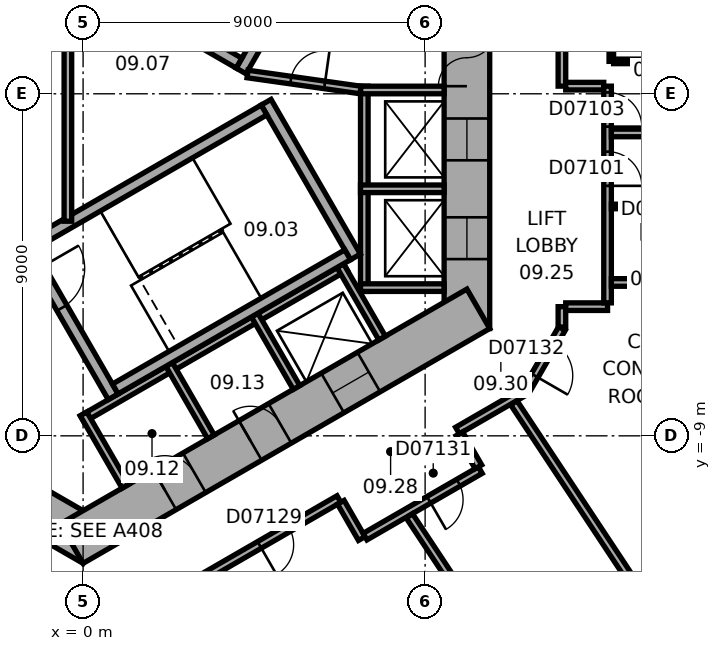
"""IFC4 building model, lengths in metres.
Left out: names, types, materials, properties, quantities, classifications, styles, units other than length and angle.
Written with IfcOpenShell. Run it as: python <this file> out.ifc"""

import sys

from ifc_helpers import new_model, si_unit, direction, frame, frame_2d, origin, place, context, subcontext, project, spatial, rectangle, extrude, element, fill, save


model = new_model("IFC4")
c1 = context("Model", 3, precision=1e-05, world=origin(), true_north=direction((0.0, 1.0)))
c2 = subcontext(c1, "Body", "Model", "MODEL_VIEW")
j1 = project(units=[si_unit("LENGTHUNIT", "METRE"), si_unit("PLANEANGLEUNIT", "RADIAN")], contexts=[c1])
p1 = place(None, origin())
s1 = spatial("IfcSite", under=j1, at=p1, CompositionType="ELEMENT")
p2 = place(p1, origin())
s2 = spatial("IfcBuilding", under=s1, at=p2, CompositionType="ELEMENT")
p3 = place(p2, frame((0.0, 0.0, 50.6)))
s3 = spatial("IfcBuildingStorey", under=s2, at=p3, CompositionType="ELEMENT", Elevation=50.6)
p4 = place(p3, frame((10.1, -6.177, 0.0), z_axis=(0.0, 0.0, 1.0), x_axis=(0.0, 1.0, 0.0)))
e1 = element("IfcWall", 1, at=p4, inside=s3, PredefinedType="SHEAR", context=c2, shape_type="SweptSolid", body=[
    extrude(rectangle(XDim=12.355, YDim=1.2, at=frame_2d((6.177, 0.0))), origin(), (0.0, 0.0, 1.0), 3.3),
])
p5 = place(p4, frame((6.378, 0.0, 0.0)))
e2 = element("IfcOpeningElement", 2, at=p5, cuts=e1, PredefinedType="OPENING", context=c2, shape_type="SweptSolid", body=[
    extrude(rectangle(XDim=1.5, YDim=2.1, at=frame_2d((0.75, 1.05))), frame((0.0, 0.61, 0.0), z_axis=(0.0, -1.0, 0.0), x_axis=(1.0, 0.0, 0.0)), (0.0, 0.0, 1.0), 1.22),
])
p6 = place(p4, frame((1.828, 0.0, 0.0)))
e3 = element("IfcOpeningElement", 3, at=p6, cuts=e1, PredefinedType="OPENING", context=c2, shape_type="SweptSolid", body=[
    extrude(rectangle(XDim=1.1, YDim=2.1, at=frame_2d((0.55, 1.05))), frame((0.0, 0.61, 0.0), z_axis=(0.0, -1.0, 0.0), x_axis=(1.0, 0.0, 0.0)), (0.0, 0.0, 1.0), 1.22),
])
p7 = place(p4, frame((4.427, 0.0, 0.0)))
e4 = element("IfcOpeningElement", 4, at=p7, cuts=e1, PredefinedType="OPENING", context=c2, shape_type="SweptSolid", body=[
    extrude(rectangle(XDim=1.1, YDim=2.1, at=frame_2d((0.55, 1.05))), frame((0.0, 0.61, 0.0), z_axis=(0.0, -1.0, 0.0), x_axis=(1.0, 0.0, 0.0)), (0.0, 0.0, 1.0), 1.22),
])
p8 = place(p3, frame((-10.4, -5.658, 0.0), z_axis=(0.0, 0.0, 1.0), x_axis=(0.866021384402, -0.500006961711, 0.0)))
e5 = element("IfcWall", 5, at=p8, inside=s3, PredefinedType="SHEAR", context=c2, shape_type="SweptSolid", body=[
    extrude(rectangle(XDim=12.355, YDim=1.2, at=frame_2d((6.178, 0.0))), origin(), (0.0, 0.0, 1.0), 3.3),
])
p9 = place(p8, frame((6.378, 0.0, 0.0)))
e6 = element("IfcOpeningElement", 6, at=p9, cuts=e5, PredefinedType="OPENING", context=c2, shape_type="SweptSolid", body=[
    extrude(rectangle(XDim=1.5, YDim=2.1, at=frame_2d((0.75, 1.05))), frame((0.0, 0.61, 0.0), z_axis=(0.0, -1.0, 0.0), x_axis=(1.0, 0.0, 0.0)), (0.0, 0.0, 1.0), 1.22),
])
p10 = place(p8, frame((3.228, 0.0, 0.0)))
e7 = element("IfcOpeningElement", 7, at=p10, cuts=e5, PredefinedType="OPENING", context=c2, shape_type="SweptSolid", body=[
    extrude(rectangle(XDim=0.9, YDim=2.1, at=frame_2d((0.45, 1.05))), frame((0.0, 0.61, 0.0), z_axis=(0.0, -1.0, 0.0), x_axis=(1.0, 0.0, 0.0)), (0.0, 0.0, 1.0), 1.22),
])
p11 = place(p3, frame((-0.3, -11.836, 0.0), z_axis=(0.0, 0.0, 1.0), x_axis=(0.866021384402, 0.500006961711, 0.0)))
e8 = element("IfcWall", 8, at=p11, inside=s3, PredefinedType="SHEAR", context=c2, shape_type="SweptSolid", body=[
    extrude(rectangle(XDim=12.355, YDim=1.2, at=frame_2d((6.178, 0.0))), origin(), (0.0, 0.0, 1.0), 3.3),
])
p12 = place(p11, frame((2.828, 0.0, 0.0)))
e9 = element("IfcOpeningElement", 9, at=p12, cuts=e8, PredefinedType="OPENING", context=c2, shape_type="SweptSolid", body=[
    extrude(rectangle(XDim=0.9, YDim=2.1, at=frame_2d((0.45, 1.05))), frame((0.0, 0.61, 0.0), z_axis=(0.0, -1.0, 0.0), x_axis=(1.0, 0.0, 0.0)), (0.0, 0.0, 1.0), 1.22),
])
p13 = place(p11, frame((5.428, 0.0, 0.0)))
e10 = element("IfcOpeningElement", 10, at=p13, cuts=e8, PredefinedType="OPENING", context=c2, shape_type="SweptSolid", body=[
    extrude(rectangle(XDim=0.9, YDim=2.1, at=frame_2d((0.45, 1.05))), frame((0.0, 0.61, 0.0), z_axis=(0.0, -1.0, 0.0), x_axis=(1.0, 0.0, 0.0)), (0.0, 0.0, 1.0), 1.22),
])
p14 = place(p11, frame((7.928, 0.0, 0.0)))
e11 = element("IfcOpeningElement", 11, at=p14, cuts=e8, PredefinedType="OPENING", context=c2, shape_type="SweptSolid", body=[
    extrude(rectangle(XDim=1.1, YDim=2.1, at=frame_2d((0.55, 1.05))), frame((0.0, 0.61, 0.0), z_axis=(0.0, -1.0, 0.0), x_axis=(1.0, 0.0, 0.0)), (0.0, 0.0, 1.0), 1.22),
])
p15 = place(p3, frame((7.4, -5.2, 0.0), z_axis=(0.0, 0.0, 1.0), x_axis=(0.0, 1.0, 0.0)))
e12 = element("IfcWall", 12, at=p15, inside=s3, PredefinedType="PARTITIONING", context=c2, shape_type="SweptSolid", body=[
    extrude(rectangle(XDim=5.4, YDim=0.2, at=frame_2d((2.7, 0.0))), origin(), (0.0, 0.0, 1.0), 3.05),
])
for number, where, z_axis, x_axis in (
    (13, (7.3, -5.1, 0.0), (0.0, 0.0, 1.0), (1.0, 0.0, 0.0)),
    (14, (7.3, -2.5, 0.0), (0.0, 0.0, 1.0), (1.0, 0.0, 0.0)),
    (15, (7.3, 0.1, 0.0), (0.0, 0.0, 1.0), (1.0, 0.0, 0.0)),
):
    element("IfcWall", number, at=place(p3, frame(where, z_axis=z_axis, x_axis=x_axis)), inside=s3, PredefinedType="PARTITIONING", context=c2, shape_type="SweptSolid", body=[
        extrude(rectangle(XDim=2.2, YDim=0.2, at=frame_2d((1.1, 0.0))), origin(), (0.0, 0.0, 1.0), 3.05),
    ])
p16 = place(p3, frame((-0.024, -8.559, 0.0), z_axis=(0.0, 0.0, 1.0), x_axis=(0.866026010844, 0.49999894854, 0.0)))
e16 = element("IfcWall", 16, at=p16, inside=s3, PredefinedType="PARTITIONING", context=c2, shape_type="SweptSolid", body=[
    extrude(rectangle(XDim=8.0, YDim=0.2, at=frame_2d((4.0, 0.0))), origin(), (0.0, 0.0, 1.0), 3.05),
])
for number, where, z_axis, x_axis in (
    (17, (0.013, -8.422, 0.0), (0.0, 0.0, 1.0), (0.5, -0.866, 0.0)),
    (18, (2.264, -7.122, 0.0), (0.0, 0.0, 1.0), (0.5, -0.866, 0.0)),
    (19, (4.516, -5.822, 0.0), (0.0, 0.0, 1.0), (0.5, -0.866, 0.0)),
    (20, (6.768, -4.522, 0.0), (0.0, 0.0, 1.0), (0.5, -0.866, 0.0)),
):
    element("IfcWall", number, at=place(p3, frame(where, z_axis=z_axis, x_axis=x_axis)), inside=s3, PredefinedType="PARTITIONING", context=c2, shape_type="SweptSolid", body=[
        extrude(rectangle(XDim=2.2, YDim=0.2, at=frame_2d((1.1, 0.0))), origin(), (0.0, 0.0, 1.0), 3.05),
    ])
p17 = place(p3, frame((4.158, 0.602, 0.0), z_axis=(0.0, 0.0, 1.0), x_axis=(0.499977259774, 0.866038532462, 0.0)))
e21 = element("IfcWall", 21, at=p17, inside=s3, PredefinedType="SHEAR", context=c2, shape_type="SweptSolid", body=[
    extrude(rectangle(XDim=4.7, YDim=0.3, at=frame_2d((2.35, 0.0))), origin(), (0.0, 0.0, 1.0), 3.05),
])
p18 = place(p17, frame((0.8, 0.0, 0.0)))
e22 = element("IfcOpeningElement", 22, at=p18, cuts=e21, PredefinedType="OPENING", context=c2, shape_type="SweptSolid", body=[
    extrude(rectangle(XDim=1.2, YDim=2.1, at=frame_2d((0.6, 1.05))), frame((0.0, 0.16, 0.0), z_axis=(0.0, -1.0, 0.0), x_axis=(1.0, 0.0, 0.0)), (0.0, 0.0, 1.0), 0.32),
])
p19 = place(p3, frame((4.103, 0.807, 0.0), z_axis=(0.0, 0.0, 1.0), x_axis=(-0.866027801685, 0.499995846692, 0.0)))
e23 = element("IfcWall", 23, at=p19, inside=s3, PredefinedType="SHEAR", context=c2, shape_type="SweptSolid", body=[
    extrude(rectangle(XDim=7.06, YDim=0.3, at=frame_2d((3.53, 0.0))), origin(), (0.0, 0.0, 1.0), 3.05),
])
p20 = place(p3, frame((-1.558, -3.902, 0.0), z_axis=(0.0, 0.0, 1.0), x_axis=(0.499977259774, -0.866038532462, 0.0)))
e24 = element("IfcWall", 24, at=p20, inside=s3, PredefinedType="SHEAR", context=c2, shape_type="SweptSolid", body=[
    extrude(rectangle(XDim=4.7, YDim=0.3, at=frame_2d((2.35, 0.0))), origin(), (0.0, 0.0, 1.0), 3.05),
])
p21 = place(p20, frame((0.8, 0.0, 0.0)))
e25 = element("IfcOpeningElement", 25, at=p21, cuts=e24, PredefinedType="OPENING", context=c2, shape_type="SweptSolid", body=[
    extrude(rectangle(XDim=1.2, YDim=2.1, at=frame_2d((0.6, 1.05))), frame((0.0, 0.16, 0.0), z_axis=(0.0, -1.0, 0.0), x_axis=(1.0, 0.0, 0.0)), (0.0, 0.0, 1.0), 0.32),
])
p22 = place(p3, frame((4.816, -0.222, 0.0), z_axis=(0.0, 0.0, 1.0), x_axis=(0.499977259774, -0.866038532462, 0.0)))
e26 = element("IfcWall", 26, at=p22, inside=s3, PredefinedType="SHEAR", context=c2, shape_type="SweptSolid", body=[
    extrude(rectangle(XDim=4.7, YDim=0.3, at=frame_2d((2.35, 0.0))), origin(), (0.0, 0.0, 1.0), 3.05),
])
for number, where, z_axis, x_axis in (
    (27, (-1.353, -3.957, 0.0), (0.0, 0.0, 1.0), (0.866, 0.5, 0.0)),
    (28, (0.847, -7.767, 0.0), (0.0, 0.0, 1.0), (0.866, 0.5, 0.0)),
):
    element("IfcWall", number, at=place(p3, frame(where, z_axis=z_axis, x_axis=x_axis)), inside=s3, PredefinedType="SHEAR", context=c2, shape_type="SweptSolid", body=[
        extrude(rectangle(XDim=7.06, YDim=0.3, at=frame_2d((3.53, 0.0))), origin(), (0.0, 0.0, 1.0), 3.05),
    ])
p23 = place(p3, frame((4.327, 0.521, 0.0), z_axis=(0.0, 0.0, 1.0), x_axis=(0.990124376366, -0.14019172346, 0.0)))
e29 = element("IfcWall", 29, at=p23, inside=s3, PredefinedType="PARTITIONING", context=c2, shape_type="SweptSolid", body=[
    extrude(rectangle(XDim=3.002, YDim=0.2, at=frame_2d((1.501, 0.0))), origin(), (0.0, 0.0, 1.0), 3.05),
])
p24 = place(p23, frame((1.15, 0.0, 0.0)))
e30 = element("IfcOpeningElement", 30, at=p24, cuts=e29, PredefinedType="OPENING", context=c2, shape_type="SweptSolid", body=[
    extrude(rectangle(XDim=0.9, YDim=2.1, at=frame_2d((0.45, 1.05))), frame((0.0, 0.11, 0.0), z_axis=(0.0, -1.0, 0.0), x_axis=(1.0, 0.0, 0.0)), (0.0, 0.0, 1.0), 0.22),
])
p25 = place(p3, frame((-0.4, -3.353, 0.0), z_axis=(0.0, 0.0, 1.0), x_axis=(0.0, 1.0, 0.0)))
e31 = element("IfcWall", 31, at=p25, inside=s3, PredefinedType="PARTITIONING", context=c2, shape_type="SweptSolid", body=[
    extrude(rectangle(XDim=6.707, YDim=0.2, at=frame_2d((3.353, 0.0))), origin(), (0.0, 0.0, 1.0), 3.05),
])
p26 = place(p3, frame((1.033, -13.953, 0.0), z_axis=(0.0, 0.0, 1.0), x_axis=(0.866017531406, 0.500013635111, 0.0)))
e32 = element("IfcWall", 32, at=p26, inside=s3, PredefinedType="PARTITIONING", context=c2, shape_type="SweptSolid", body=[
    extrude(rectangle(XDim=6.58, YDim=0.2, at=frame_2d((3.29, 0.0))), origin(), (0.0, 0.0, 1.0), 3.05),
])
p27 = place(p26, frame((4.165, 0.0, 0.0)))
e33 = element("IfcOpeningElement", 33, at=p27, cuts=e32, PredefinedType="OPENING", context=c2, shape_type="SweptSolid", body=[
    extrude(rectangle(XDim=0.9, YDim=2.1, at=frame_2d((0.45, 1.05))), frame((0.0, 0.11, 0.0), z_axis=(0.0, -1.0, 0.0), x_axis=(1.0, 0.0, 0.0)), (0.0, 0.0, 1.0), 0.22),
])
p28 = place(p3, frame((6.782, -10.749, 0.0), z_axis=(0.0, 0.0, 1.0), x_axis=(0.500074377092, -0.865982457891, 0.0)))
e34 = element("IfcWall", 34, at=p28, inside=s3, PredefinedType="PARTITIONING", context=c2, shape_type="SweptSolid", body=[
    extrude(rectangle(XDim=1.101, YDim=0.2, at=frame_2d((0.55, 0.0))), origin(), (0.0, 0.0, 1.0), 3.05),
])
p29 = place(p3, frame((7.419, -11.653, 0.0), z_axis=(0.0, 0.0, 1.0), x_axis=(0.866038154057, 0.49997791523, 0.0)))
e35 = element("IfcWall", 35, at=p29, inside=s3, PredefinedType="PARTITIONING", context=c2, shape_type="SweptSolid", body=[
    extrude(rectangle(XDim=3.502, YDim=0.2, at=frame_2d((1.751, 0.0))), origin(), (0.0, 0.0, 1.0), 3.05),
])
p30 = place(p29, frame((1.94, 0.0, 0.0)))
e36 = element("IfcOpeningElement", 36, at=p30, cuts=e35, PredefinedType="OPENING", context=c2, shape_type="SweptSolid", body=[
    extrude(rectangle(XDim=0.9, YDim=2.1, at=frame_2d((0.45, 1.05))), frame((0.0, 0.11, 0.0), z_axis=(0.0, -1.0, 0.0), x_axis=(1.0, 0.0, 0.0)), (0.0, 0.0, 1.0), 0.22),
])
p31 = place(p3, frame((9.852, -8.861, 0.0), z_axis=(0.0, 0.0, 1.0), x_axis=(0.866013291437, 0.500020978615, 0.0)))
e37 = element("IfcWall", 37, at=p31, inside=s3, PredefinedType="PARTITIONING", context=c2, shape_type="SweptSolid", body=[
    extrude(rectangle(XDim=2.077, YDim=0.2, at=frame_2d((1.038, 0.0))), origin(), (0.0, 0.0, 1.0), 3.05),
])
p32 = place(p3, frame((10.402, -9.815, 0.0), z_axis=(0.0, 0.0, 1.0), x_axis=(-0.499968756647, 0.866043441391, 0.0)))
e38 = element("IfcWall", 38, at=p32, inside=s3, PredefinedType="PARTITIONING", context=c2, shape_type="SweptSolid", body=[
    extrude(rectangle(XDim=1.001, YDim=0.2, at=frame_2d((0.5, 0.0))), origin(), (0.0, 0.0, 1.0), 3.05),
])
p33 = place(p3, frame((11.67, -7.788, 0.0), z_axis=(0.0, 0.0, 1.0), x_axis=(0.500063286585, 0.865988862174, 0.0)))
e39 = element("IfcWall", 39, at=p33, inside=s3, PredefinedType="PARTITIONING", context=c2, shape_type="SweptSolid", body=[
    extrude(rectangle(XDim=1.86, YDim=0.2, at=frame_2d((0.93, 0.0))), origin(), (0.0, 0.0, 1.0), 3.05),
])
p34 = place(p33, frame((0.43, 0.0, 0.0)))
e40 = element("IfcOpeningElement", 40, at=p34, cuts=e39, PredefinedType="OPENING", context=c2, shape_type="SweptSolid", body=[
    extrude(rectangle(XDim=1.0, YDim=2.1, at=frame_2d((0.5, 1.05))), frame((0.0, 0.11, 0.0), z_axis=(0.0, -1.0, 0.0), x_axis=(1.0, 0.0, 0.0)), (0.0, 0.0, 1.0), 0.22),
])
p35 = place(p3, frame((12.6, -6.138, 0.0), z_axis=(0.0, 0.0, 1.0), x_axis=(0.0, 1.0, 0.0)))
e41 = element("IfcWall", 41, at=p35, inside=s3, PredefinedType="PARTITIONING", context=c2, shape_type="SweptSolid", body=[
    extrude(rectangle(XDim=0.537, YDim=0.2, at=frame_2d((0.268, 0.0))), origin(), (0.0, 0.0, 1.0), 3.05),
])
p36 = place(p3, frame((12.6, 0.201, 0.0), z_axis=(0.0, 0.0, 1.0), x_axis=(0.0, 1.0, 0.0)))
e42 = element("IfcWall", 42, at=p36, inside=s3, PredefinedType="PARTITIONING", context=c2, shape_type="SweptSolid", body=[
    extrude(rectangle(XDim=2.604, YDim=0.2, at=frame_2d((1.302, 0.0))), origin(), (0.0, 0.0, 1.0), 3.05),
])
p37 = place(p3, frame((12.7, -5.601, 0.0), z_axis=(0.0, 0.0, 1.0), x_axis=(1.0, 0.0, 0.0)))
e43 = element("IfcWall", 43, at=p37, inside=s3, PredefinedType="PARTITIONING", context=c2, shape_type="SweptSolid", body=[
    extrude(rectangle(XDim=1.101, YDim=0.2, at=frame_2d((0.551, 0.0))), origin(), (0.0, 0.0, 1.0), 3.05),
])
p38 = place(p3, frame((12.974, -17.735, 0.0), z_axis=(0.0, 0.0, 1.0), x_axis=(-0.55192625685, 0.833892922982, 0.0)))
e44 = element("IfcWall", 44, at=p38, inside=s3, PredefinedType="PARTITIONING", context=c2, shape_type="SweptSolid", body=[
    extrude(rectangle(XDim=7.95, YDim=0.2, at=frame_2d((3.975, 0.0))), origin(), (0.0, 0.0, 1.0), 3.05),
])
p39 = place(p3, frame((13.701, 0.201, 0.0), z_axis=(0.0, 0.0, 1.0), x_axis=(-1.0, 0.0, 0.0)))
e45 = element("IfcWall", 45, at=p39, inside=s3, PredefinedType="PARTITIONING", context=c2, shape_type="SweptSolid", body=[
    extrude(rectangle(XDim=1.001, YDim=0.2, at=frame_2d((0.5, 0.0))), origin(), (0.0, 0.0, 1.0), 3.05),
])
p40 = place(p3, frame((13.801, -5.501, 0.0), z_axis=(0.0, 0.0, 1.0), x_axis=(0.0, 1.0, 0.0)))
e46 = element("IfcWall", 46, at=p40, inside=s3, PredefinedType="PARTITIONING", context=c2, shape_type="SweptSolid", body=[
    extrude(rectangle(XDim=5.702, YDim=0.2, at=frame_2d((2.851, 0.0))), origin(), (0.0, 0.0, 1.0), 3.05),
])
p41 = place(p40, frame((3.079, 0.0, 0.0)))
e47 = element("IfcOpeningElement", 47, at=p41, cuts=e46, PredefinedType="OPENING", context=c2, shape_type="SweptSolid", body=[
    extrude(rectangle(XDim=0.9, YDim=2.1, at=frame_2d((0.45, 1.05))), frame((0.0, 0.11, 0.0), z_axis=(0.0, -1.0, 0.0), x_axis=(1.0, 0.0, 0.0)), (0.0, 0.0, 1.0), 0.22),
])
p42 = place(p40, frame((4.636, 0.0, 0.0)))
e48 = element("IfcOpeningElement", 48, at=p42, cuts=e46, PredefinedType="OPENING", context=c2, shape_type="SweptSolid", body=[
    extrude(rectangle(XDim=0.9, YDim=2.1, at=frame_2d((0.45, 1.05))), frame((0.0, 0.11, 0.0), z_axis=(0.0, -1.0, 0.0), x_axis=(1.0, 0.0, 0.0)), (0.0, 0.0, 1.0), 0.22),
])
p43 = place(p3, frame((13.901, -4.965, 0.0), z_axis=(0.0, 0.0, 1.0), x_axis=(1.0, 0.0, 0.0)))
e49 = element("IfcWall", 49, at=p43, inside=s3, PredefinedType="PARTITIONING", context=c2, shape_type="SweptSolid", body=[
    extrude(rectangle(XDim=8.049, YDim=0.2, at=frame_2d((4.024, 0.0))), origin(), (0.0, 0.0, 1.0), 3.05),
])
p44 = place(p3, frame((13.901, -2.965, 0.0), z_axis=(0.0, 0.0, 1.0), x_axis=(1.0, 0.0, 0.0)))
e50 = element("IfcWall", 50, at=p44, inside=s3, PredefinedType="PARTITIONING", context=c2, shape_type="SweptSolid", body=[
    extrude(rectangle(XDim=2.5, YDim=0.12, at=frame_2d((1.25, 0.0))), origin(), (0.0, 0.0, 1.0), 3.05),
])
p45 = place(p44, frame((0.8, 0.0, 0.0)))
e51 = element("IfcOpeningElement", 51, at=p45, cuts=e50, PredefinedType="OPENING", context=c2, shape_type="SweptSolid", body=[
    extrude(rectangle(XDim=0.9, YDim=2.1, at=frame_2d((0.45, 1.05))), frame((0.0, 0.07, 0.0), z_axis=(0.0, -1.0, 0.0), x_axis=(1.0, 0.0, 0.0)), (0.0, 0.0, 1.0), 0.14),
])
p46 = place(p3, frame((13.9, 0.853, 0.0), z_axis=(0.0, 0.0, 1.0), x_axis=(0.0, 1.0, 0.0)))
e52 = element("IfcWall", 52, at=p46, inside=s3, PredefinedType="PARTITIONING", context=c2, shape_type="SweptSolid", body=[
    extrude(rectangle(XDim=1.4, YDim=0.12, at=frame_2d((0.7, 0.0))), origin(), (0.0, 0.0, 1.0), 3.05),
])
p47 = place(p3, frame((16.255, -15.564, 0.0), z_axis=(0.0, 0.0, 1.0), x_axis=(-0.55192208744, 0.833895682562, 0.0)))
e53 = element("IfcWall", 53, at=p47, inside=s3, PredefinedType="PARTITIONING", context=c2, shape_type="SweptSolid", body=[
    extrude(rectangle(XDim=8.913, YDim=0.2, at=frame_2d((4.457, 0.0))), origin(), (0.0, 0.0, 1.0), 2.6),
])
p48 = place(p3, frame((16.5, 0.853, 0.0), z_axis=(0.0, 0.0, 1.0), x_axis=(-1.0, 0.0, 0.0)))
e54 = element("IfcWall", 54, at=p48, inside=s3, PredefinedType="PARTITIONING", context=c2, shape_type="SweptSolid", body=[
    extrude(rectangle(XDim=2.54, YDim=0.12, at=frame_2d((1.27, 0.0))), origin(), (0.0, 0.0, 1.0), 3.05),
])
p49 = place(p48, frame((0.82, 0.0, 0.0)))
e55 = element("IfcOpeningElement", 55, at=p49, cuts=e54, PredefinedType="OPENING", context=c2, shape_type="SweptSolid", body=[
    extrude(rectangle(XDim=0.9, YDim=2.1, at=frame_2d((0.45, 1.05))), frame((0.0, 0.07, 0.0), z_axis=(0.0, -1.0, 0.0), x_axis=(1.0, 0.0, 0.0)), (0.0, 0.0, 1.0), 0.14),
])
p50 = place(p3, frame((21.95, -1.03, 0.0), z_axis=(0.0, 0.0, 1.0), x_axis=(-1.0, 0.0, 0.0)))
e56 = element("IfcWall", 56, at=p50, inside=s3, PredefinedType="PARTITIONING", context=c2, shape_type="SweptSolid", body=[
    extrude(rectangle(XDim=8.049, YDim=0.2, at=frame_2d((4.024, 0.0))), origin(), (0.0, 0.0, 1.0), 2.6),
])
p51 = place(p5, origin())
e57 = element("IfcDoor", 57, at=p51, inside=s3, OperationType="DOUBLE_DOOR_SINGLE_SWING", PredefinedType="DOOR", context=c2, shape_type="SweptSolid", body=[
    extrude(rectangle(XDim=1.5, YDim=2.1, at=frame_2d((0.75, 1.05))), frame((0.0, 0.025, 0.0), z_axis=(0.0, -1.0, 0.0), x_axis=(1.0, 0.0, 0.0)), (0.0, 0.0, 1.0), 0.05),
])
fill(e2, e57)
p52 = place(p21, origin())
e58 = element("IfcDoor", 58, at=p52, inside=s3, OperationType="SINGLE_SWING_RIGHT", PredefinedType="DOOR", context=c2, shape_type="SweptSolid", body=[
    extrude(rectangle(XDim=1.2, YDim=2.1, at=frame_2d((0.6, 1.05))), frame((0.0, 0.025, 0.0), z_axis=(0.0, -1.0, 0.0), x_axis=(1.0, 0.0, 0.0)), (0.0, 0.0, 1.0), 0.05),
])
fill(e25, e58)
p53 = place(p24, origin())
e59 = element("IfcDoor", 59, at=p53, inside=s3, OperationType="SINGLE_SWING_LEFT", PredefinedType="DOOR", context=c2, shape_type="SweptSolid", body=[
    extrude(rectangle(XDim=0.9, YDim=2.1, at=frame_2d((0.45, 1.05))), frame((0.0, 0.025, 0.0), z_axis=(0.0, -1.0, 0.0), x_axis=(1.0, 0.0, 0.0)), (0.0, 0.0, 1.0), 0.05),
])
fill(e30, e59)
p54 = place(p12, origin())
e60 = element("IfcDoor", 60, at=p54, inside=s3, OperationType="SINGLE_SWING_LEFT", PredefinedType="DOOR", context=c2, shape_type="SweptSolid", body=[
    extrude(rectangle(XDim=0.9, YDim=2.1, at=frame_2d((0.45, 1.05))), frame((0.0, 0.025, 0.0), z_axis=(0.0, -1.0, 0.0), x_axis=(1.0, 0.0, 0.0)), (0.0, 0.0, 1.0), 0.05),
])
fill(e9, e60)
p55 = place(p13, origin())
e61 = element("IfcDoor", 61, at=p55, inside=s3, OperationType="SINGLE_SWING_LEFT", PredefinedType="DOOR", context=c2, shape_type="SweptSolid", body=[
    extrude(rectangle(XDim=0.9, YDim=2.1, at=frame_2d((0.45, 1.05))), frame((0.0, 0.025, 0.0), z_axis=(0.0, -1.0, 0.0), x_axis=(1.0, 0.0, 0.0)), (0.0, 0.0, 1.0), 0.05),
])
fill(e10, e61)
p56 = place(p6, origin())
e62 = element("IfcDoor", 62, at=p56, inside=s3, OperationType="DOUBLE_DOOR_SLIDING", PredefinedType="DOOR", context=c2, shape_type="SweptSolid", body=[
    extrude(rectangle(XDim=1.1, YDim=2.1, at=frame_2d((0.55, 1.05))), frame((0.0, 0.025, 0.0), z_axis=(0.0, -1.0, 0.0), x_axis=(1.0, 0.0, 0.0)), (0.0, 0.0, 1.0), 0.05),
])
fill(e3, e62)
p57 = place(p7, origin())
e63 = element("IfcDoor", 63, at=p57, inside=s3, OperationType="DOUBLE_DOOR_SLIDING", PredefinedType="DOOR", context=c2, shape_type="SweptSolid", body=[
    extrude(rectangle(XDim=1.1, YDim=2.1, at=frame_2d((0.55, 1.05))), frame((0.0, 0.025, 0.0), z_axis=(0.0, -1.0, 0.0), x_axis=(1.0, 0.0, 0.0)), (0.0, 0.0, 1.0), 0.05),
])
fill(e4, e63)
p58 = place(p14, origin())
e64 = element("IfcDoor", 64, at=p58, inside=s3, OperationType="DOUBLE_DOOR_SLIDING", PredefinedType="DOOR", context=c2, shape_type="SweptSolid", body=[
    extrude(rectangle(XDim=1.1, YDim=2.1, at=frame_2d((0.55, 1.05))), frame((0.0, 0.025, 0.0), z_axis=(0.0, -1.0, 0.0), x_axis=(1.0, 0.0, 0.0)), (0.0, 0.0, 1.0), 0.05),
])
fill(e11, e64)
p59 = place(p41, origin())
e65 = element("IfcDoor", 65, at=p59, inside=s3, OperationType="SINGLE_SWING_LEFT", PredefinedType="DOOR", context=c2, shape_type="SweptSolid", body=[
    extrude(rectangle(XDim=0.9, YDim=2.1, at=frame_2d((0.45, 1.05))), frame((0.0, 0.025, 0.0), z_axis=(0.0, -1.0, 0.0), x_axis=(1.0, 0.0, 0.0)), (0.0, 0.0, 1.0), 0.05),
])
fill(e47, e65)
p60 = place(p42, origin())
e66 = element("IfcDoor", 66, at=p60, inside=s3, OperationType="SINGLE_SWING_LEFT", PredefinedType="DOOR", context=c2, shape_type="SweptSolid", body=[
    extrude(rectangle(XDim=0.9, YDim=2.1, at=frame_2d((0.45, 1.05))), frame((0.0, 0.025, 0.0), z_axis=(0.0, -1.0, 0.0), x_axis=(1.0, 0.0, 0.0)), (0.0, 0.0, 1.0), 0.05),
])
fill(e48, e66)
p61 = place(p27, origin())
e67 = element("IfcDoor", 67, at=p61, inside=s3, OperationType="SINGLE_SWING_LEFT", PredefinedType="DOOR", context=c2, shape_type="SweptSolid", body=[
    extrude(rectangle(XDim=0.9, YDim=2.1, at=frame_2d((0.45, 1.05))), frame((0.0, 0.025, 0.0), z_axis=(0.0, -1.0, 0.0), x_axis=(1.0, 0.0, 0.0)), (0.0, 0.0, 1.0), 0.05),
])
fill(e33, e67)
p62 = place(p30, origin())
e68 = element("IfcDoor", 68, at=p62, inside=s3, OperationType="SINGLE_SWING_LEFT", PredefinedType="DOOR", context=c2, shape_type="SweptSolid", body=[
    extrude(rectangle(XDim=0.9, YDim=2.1, at=frame_2d((0.45, 1.05))), frame((0.0, 0.025, 0.0), z_axis=(0.0, -1.0, 0.0), x_axis=(1.0, 0.0, 0.0)), (0.0, 0.0, 1.0), 0.05),
])
fill(e36, e68)
p63 = place(p34, origin())
e69 = element("IfcDoor", 69, at=p63, inside=s3, OperationType="SINGLE_SWING_LEFT", PredefinedType="DOOR", context=c2, shape_type="SweptSolid", body=[
    extrude(rectangle(XDim=1.0, YDim=2.1, at=frame_2d((0.5, 1.05))), frame((0.0, 0.025, 0.0), z_axis=(0.0, -1.0, 0.0), x_axis=(1.0, 0.0, 0.0)), (0.0, 0.0, 1.0), 0.05),
])
fill(e40, e69)
save(model, sys.argv[1])
